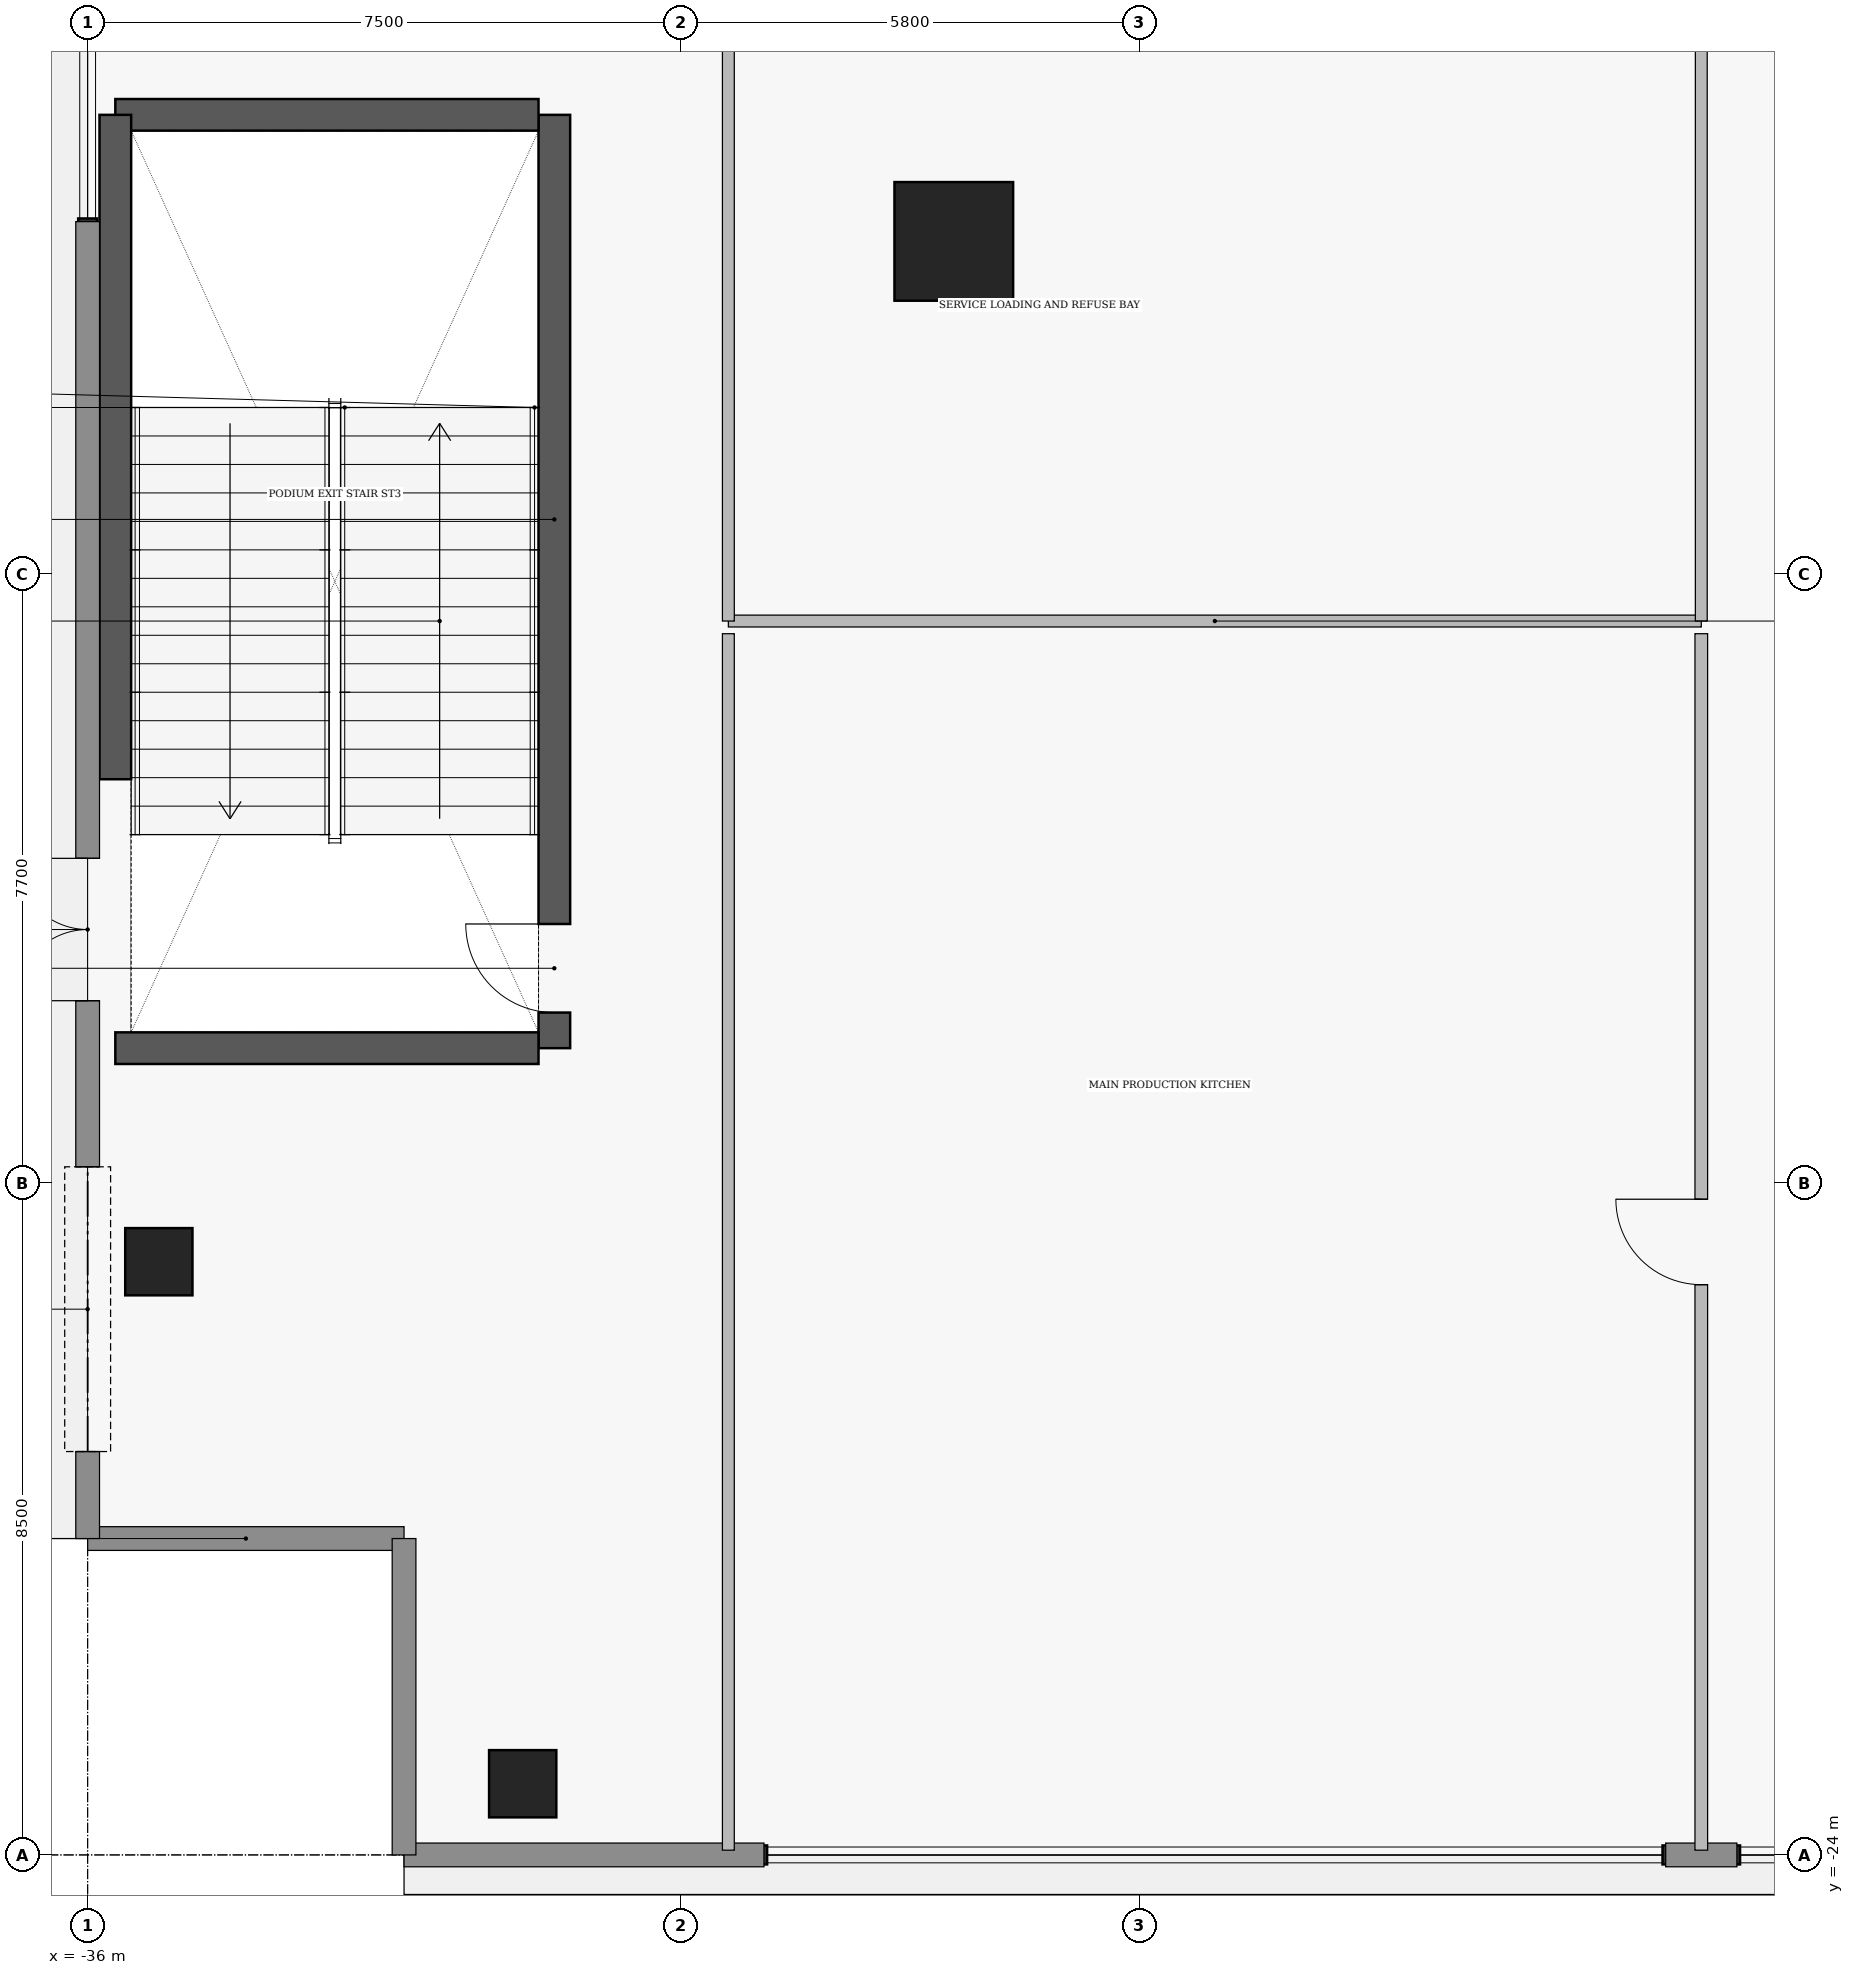
"""IFC4 building model, lengths in metres.
Left out: names, types, materials, properties, quantities, classifications, styles, units other than length and angle.
Written with IfcOpenShell. Run it as: python <this file> out.ifc"""

import sys

from ifc_helpers import new_model, si_unit, direction, frame, frame_2d, origin, origin_2d, place, context, subcontext, project, spatial, rectangle, extrude, element, fill, save


model = new_model("IFC4")
c1 = context("Model", 3, precision=1e-05, world=origin(), true_north=direction((0.0, 1.0)))
c2 = subcontext(c1, "Body", "Model", "MODEL_VIEW")
j1 = project(units=[si_unit("LENGTHUNIT", "METRE"), si_unit("PLANEANGLEUNIT", "RADIAN")], contexts=[c1])
p1 = place(None, origin())
s1 = spatial("IfcSite", under=j1, at=p1, CompositionType="ELEMENT")
p2 = place(p1, origin())
s2 = spatial("IfcBuilding", under=s1, at=p2, CompositionType="ELEMENT")
p3 = place(p2, origin())
s3 = spatial("IfcBuildingStorey", under=s2, at=p3, CompositionType="ELEMENT", Elevation=0.0)
p4 = place(p3, frame((-30.1, -13.8, 0.0), z_axis=(0.0, 0.0, 1.0), x_axis=(0.0, 1.0, 0.0)))
e1 = element("IfcWall", 1, at=p4, inside=s3, PredefinedType="SHEAR", context=c2, shape_type="SweptSolid", body=[
    extrude(rectangle(XDim=11.8, YDim=0.4, at=frame_2d((5.9, 0.0))), origin(), (0.0, 0.0, 1.0), 5.81),
])
p5 = place(p4, frame((0.45, 0.0, 0.0)))
e2 = element("IfcOpeningElement", 2, at=p5, cuts=e1, PredefinedType="OPENING", context=c2, shape_type="SweptSolid", body=[
    extrude(rectangle(XDim=1.12, YDim=2.22, at=frame_2d((0.56, 1.11))), frame((0.0, 0.21, 0.0), z_axis=(0.0, -1.0, 0.0), x_axis=(1.0, 0.0, 0.0)), (0.0, 0.0, 1.0), 0.42),
])
for number, where, z_axis, x_axis in (
    (3, (-35.65, -13.8, 0.0), (0.0, 0.0, 1.0), (1.0, 0.0, 0.0)),
    (4, (-35.65, -2.0, 0.0), (0.0, 0.0, 1.0), (1.0, 0.0, 0.0)),
):
    element("IfcWall", number, at=place(p3, frame(where, z_axis=z_axis, x_axis=x_axis)), inside=s3, PredefinedType="SHEAR", context=c2, shape_type="SweptSolid", body=[
        extrude(rectangle(XDim=5.35, YDim=0.4, at=frame_2d((2.675, 0.0))), origin(), (0.0, 0.0, 1.0), 5.81),
    ])
p6 = place(p3, frame((-35.65, -10.4, 0.0), z_axis=(0.0, 0.0, 1.0), x_axis=(0.0, 1.0, 0.0)))
e5 = element("IfcWall", 5, at=p6, inside=s3, PredefinedType="SHEAR", context=c2, shape_type="SweptSolid", body=[
    extrude(rectangle(XDim=8.4, YDim=0.4, at=frame_2d((4.2, 0.0))), origin(), (0.0, 0.0, 1.0), 5.81),
])
p7 = place(p3, frame((-25.05, -3.6, 0.0), z_axis=(0.0, 0.0, 1.0), x_axis=(1.0, 0.0, 0.0)))
e6 = element("IfcColumn", 6, at=p7, inside=s3, PredefinedType="COLUMN", context=c2, shape_type="SweptSolid", body=[
    extrude(rectangle(XDim=1.5, YDim=1.5, at=origin_2d()), origin(), (0.0, 0.0, 1.0), 6.0),
])
for number, where, z_axis, x_axis in (
    (7, (-30.5, -23.1, 0.0), (0.0, 0.0, 1.0), (1.0, 0.0, 0.0)),
    (8, (-35.1, -16.5, 0.0), (0.0, 0.0, 1.0), (1.0, 0.0, 0.0)),
):
    element("IfcColumn", number, at=place(p3, frame(where, z_axis=z_axis, x_axis=x_axis)), inside=s3, PredefinedType="COLUMN", context=c2, shape_type="SweptSolid", body=[
        extrude(rectangle(XDim=0.85, YDim=0.85, at=origin_2d()), origin(), (0.0, 0.0, 1.0), 6.0),
    ])
p8 = place(p3, frame((-32.0, -20.0, 0.0), z_axis=(0.0, 0.0, 1.0), x_axis=(-1.0, 0.0, 0.0)))
e9 = element("IfcWall", 9, at=p8, inside=s3, PredefinedType="STANDARD", context=c2, shape_type="SweptSolid", body=[
    extrude(rectangle(XDim=4.0, YDim=0.3, at=frame_2d((2.0, 0.0))), origin(), (0.0, 0.0, 1.0), 5.75),
])
p9 = place(p3, frame((-36.0, -20.0, 0.0), z_axis=(0.0, 0.0, 1.0), x_axis=(0.0, 1.0, 0.0)))
e10 = element("IfcWall", 10, at=p9, inside=s3, PredefinedType="STANDARD", context=c2, shape_type="SweptSolid", body=[
    extrude(rectangle(XDim=16.65, YDim=0.3, at=frame_2d((8.325, 0.0))), origin(), (0.0, 0.0, 1.0), 5.75),
])
p10 = place(p9, frame((6.8, 0.0, 0.0)))
e11 = element("IfcOpeningElement", 11, at=p10, cuts=e10, PredefinedType="OPENING", context=c2, shape_type="SweptSolid", body=[
    extrude(rectangle(XDim=1.8, YDim=2.4, at=frame_2d((0.9, 1.2))), frame((0.0, 0.16, 0.0), z_axis=(0.0, -1.0, 0.0), x_axis=(1.0, 0.0, 0.0)), (0.0, 0.0, 1.0), 0.32),
])
p11 = place(p9, frame((1.1, 0.0, 0.0)))
e12 = element("IfcOpeningElement", 12, at=p11, cuts=e10, PredefinedType="OPENING", context=c2, shape_type="SweptSolid", body=[
    extrude(rectangle(XDim=3.6, YDim=3.4, at=frame_2d((1.8, 1.7))), frame((0.0, 0.16, 0.0), z_axis=(0.0, -1.0, 0.0), x_axis=(1.0, 0.0, 0.0)), (0.0, 0.0, 1.0), 0.32),
])
p12 = place(p3, frame((-15.15, -24.0, 0.0), z_axis=(0.0, 0.0, 1.0), x_axis=(-1.0, 0.0, 0.0)))
e13 = element("IfcWall", 13, at=p12, inside=s3, PredefinedType="STANDARD", context=c2, shape_type="SweptSolid", body=[
    extrude(rectangle(XDim=0.9, YDim=0.3, at=frame_2d((0.45, 0.0))), origin(), (0.0, 0.0, 1.0), 5.75),
])
p13 = place(p3, frame((-27.45, -24.0, 0.0), z_axis=(0.0, 0.0, 1.0), x_axis=(-1.0, 0.0, 0.0)))
e14 = element("IfcWall", 14, at=p13, inside=s3, PredefinedType="STANDARD", context=c2, shape_type="SweptSolid", body=[
    extrude(rectangle(XDim=4.55, YDim=0.3, at=frame_2d((2.275, 0.0))), origin(), (0.0, 0.0, 1.0), 5.75),
])
p14 = place(p3, frame((-32.0, -24.0, 0.0), z_axis=(0.0, 0.0, 1.0), x_axis=(0.0, 1.0, 0.0)))
e15 = element("IfcWall", 15, at=p14, inside=s3, PredefinedType="STANDARD", context=c2, shape_type="SweptSolid", body=[
    extrude(rectangle(XDim=4.0, YDim=0.3, at=frame_2d((2.0, 0.0))), origin(), (0.0, 0.0, 1.0), 5.75),
])
p15 = place(p3, frame((-15.6, -23.94, 0.0), z_axis=(0.0, 0.0, 1.0), x_axis=(0.0, 1.0, 0.0)))
e16 = element("IfcWall", 16, at=p15, inside=s3, PredefinedType="PARTITIONING", context=c2, shape_type="SweptSolid", body=[
    extrude(rectangle(XDim=15.38, YDim=0.16, at=frame_2d((7.69, 0.0))), origin(), (0.0, 0.0, 1.0), 5.75),
])
p16 = place(p15, frame((7.15, 0.0, 0.0)))
e17 = element("IfcOpeningElement", 17, at=p16, cuts=e16, PredefinedType="OPENING", context=c2, shape_type="SweptSolid", body=[
    extrude(rectangle(XDim=1.08, YDim=2.18, at=frame_2d((0.54, 1.09))), frame((0.0, 0.09, 0.0), z_axis=(0.0, -1.0, 0.0), x_axis=(1.0, 0.0, 0.0)), (0.0, 0.0, 1.0), 0.18),
])
p17 = place(p3, frame((-27.9, -8.4, 0.0), z_axis=(0.0, 0.0, 1.0), x_axis=(1.0, 0.0, 0.0)))
e18 = element("IfcWall", 18, at=p17, inside=s3, PredefinedType="PARTITIONING", context=c2, shape_type="SweptSolid", body=[
    extrude(rectangle(XDim=12.3, YDim=0.15, at=frame_2d((6.15, 0.0))), origin(), (0.0, 0.0, 1.0), 5.75),
])
for number, where, z_axis, x_axis in (
    (19, (-27.9, -8.4, 0.0), (0.0, 0.0, 1.0), (0.0, 1.0, 0.0)),
    (20, (-15.6, -8.4, 0.0), (0.0, 0.0, 1.0), (0.0, 1.0, 0.0)),
):
    element("IfcWall", number, at=place(p3, frame(where, z_axis=z_axis, x_axis=x_axis)), inside=s3, PredefinedType="PARTITIONING", context=c2, shape_type="SweptSolid", body=[
        extrude(rectangle(XDim=7.9, YDim=0.15, at=frame_2d((3.95, 0.0))), origin(), (0.0, 0.0, 1.0), 5.75),
    ])
p18 = place(p3, frame((-27.9, -23.94, 0.0), z_axis=(0.0, 0.0, 1.0), x_axis=(0.0, 1.0, 0.0)))
e21 = element("IfcWall", 21, at=p18, inside=s3, PredefinedType="PARTITIONING", context=c2, shape_type="SweptSolid", body=[
    extrude(rectangle(XDim=15.38, YDim=0.15, at=frame_2d((7.69, 0.0))), origin(), (0.0, 0.0, 1.0), 5.75),
])
p19 = place(p10, origin())
e22 = element("IfcDoor", 22, at=p19, inside=s3, OperationType="DOUBLE_DOOR_SINGLE_SWING", PredefinedType="DOOR", context=c2, shape_type="SweptSolid", body=[
    extrude(rectangle(XDim=1.8, YDim=2.4, at=frame_2d((0.9, 1.2))), frame((0.0, 0.025, 0.0), z_axis=(0.0, -1.0, 0.0), x_axis=(1.0, 0.0, 0.0)), (0.0, 0.0, 1.0), 0.05),
])
fill(e11, e22)
p20 = place(p11, origin())
e23 = element("IfcDoor", 23, at=p20, inside=s3, OperationType="ROLLINGUP", PredefinedType="GATE", context=c2, shape_type="SweptSolid", body=[
    extrude(rectangle(XDim=3.6, YDim=3.4, at=frame_2d((1.8, 1.7))), frame((0.0, 0.025, 0.0), z_axis=(0.0, -1.0, 0.0), x_axis=(1.0, 0.0, 0.0)), (0.0, 0.0, 1.0), 0.05),
])
fill(e12, e23)
p21 = place(p5, origin())
e24 = element("IfcDoor", 24, at=p21, inside=s3, OperationType="SINGLE_SWING_RIGHT", PredefinedType="DOOR", context=c2, shape_type="SweptSolid", body=[
    extrude(rectangle(XDim=1.12, YDim=2.22, at=frame_2d((0.56, 1.11))), frame((0.0, 0.025, 0.0), z_axis=(0.0, -1.0, 0.0), x_axis=(1.0, 0.0, 0.0)), (0.0, 0.0, 1.0), 0.05),
])
fill(e2, e24)
p22 = place(p16, origin())
e25 = element("IfcDoor", 25, at=p22, inside=s3, OperationType="SINGLE_SWING_RIGHT", PredefinedType="DOOR", context=c2, shape_type="SweptSolid", body=[
    extrude(rectangle(XDim=1.08, YDim=2.18, at=frame_2d((0.54, 1.09))), frame((0.0, 0.025, 0.0), z_axis=(0.0, -1.0, 0.0), x_axis=(1.0, 0.0, 0.0)), (0.0, 0.0, 1.0), 0.05),
])
fill(e17, e25)
save(model, sys.argv[1])
